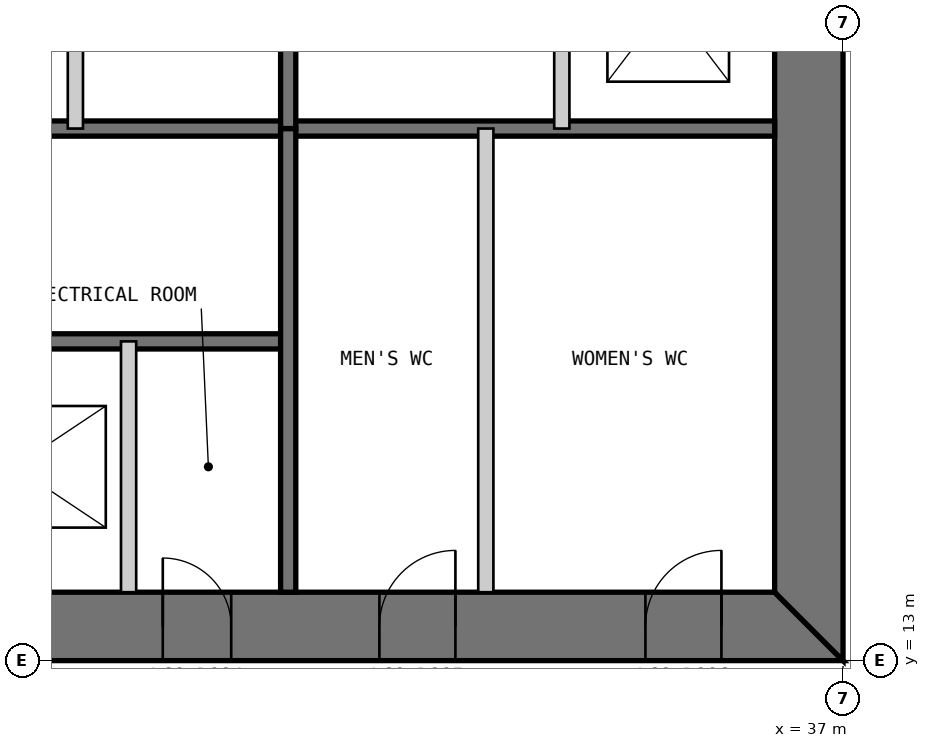
"""IFC4 building model, lengths in metres.
Left out: names, types, materials, properties, quantities, classifications, styles, units other than length and angle.
Written with IfcOpenShell. Run it as: python <this file> out.ifc"""

import sys

from ifc_helpers import new_model, si_unit, direction, frame, frame_2d, origin, place, context, subcontext, project, spatial, polyline, rectangle, outline, extrude, element, fill, save


model = new_model("IFC4")
c1 = context("Model", 3, precision=1e-05, world=origin(), true_north=direction((0.0, 1.0)))
c2 = subcontext(c1, "Body", "Model", "MODEL_VIEW")
j1 = project(units=[si_unit("LENGTHUNIT", "METRE"), si_unit("PLANEANGLEUNIT", "RADIAN")], contexts=[c1])
p1 = place(None, origin())
s1 = spatial("IfcSite", under=j1, at=p1, CompositionType="ELEMENT")
p2 = place(p1, origin())
s2 = spatial("IfcBuilding", under=s1, at=p2, CompositionType="ELEMENT")
p3 = place(p2, frame((0.0, 0.0, 256.0)))
s3 = spatial("IfcBuildingStorey", under=s2, at=p3, CompositionType="ELEMENT", Elevation=256.0)
p4 = place(p3, frame((13.0, 13.45, 0.0), z_axis=(0.0, 0.0, 1.0), x_axis=(1.0, 0.0, 0.0)))
e1 = element("IfcWall", 1, at=p4, inside=s3, PredefinedType="SHEAR", context=c2, shape_type="SweptSolid", body=[
    extrude(outline(polyline([(0.0, -0.45), (24.0, -0.45), (23.1, 0.45), (0.9, 0.45), (0.0, -0.45)])), origin(), (0.0, 0.0, 1.0), 3.4),
])
p5 = place(p4, frame((4.9, 0.0, 0.0)))
e2 = element("IfcOpeningElement", 2, at=p5, cuts=e1, PredefinedType="OPENING", context=c2, shape_type="SweptSolid", body=[
    extrude(rectangle(XDim=1.0, YDim=2.2, at=frame_2d((0.5, 1.1))), frame((0.0, 0.46, 0.0), z_axis=(0.0, -1.0, 0.0), x_axis=(1.0, 0.0, 0.0)), (0.0, 0.0, 1.0), 0.92),
])
p6 = place(p4, frame((8.9, 0.0, 0.0)))
e3 = element("IfcOpeningElement", 3, at=p6, cuts=e1, PredefinedType="OPENING", context=c2, shape_type="SweptSolid", body=[
    extrude(rectangle(XDim=1.1, YDim=2.2, at=frame_2d((0.55, 1.1))), frame((0.0, 0.46, 0.0), z_axis=(0.0, -1.0, 0.0), x_axis=(1.0, 0.0, 0.0)), (0.0, 0.0, 1.0), 0.92),
])
p7 = place(p4, frame((15.05, 0.0, 0.0)))
e4 = element("IfcOpeningElement", 4, at=p7, cuts=e1, PredefinedType="OPENING", context=c2, shape_type="SweptSolid", body=[
    extrude(rectangle(XDim=0.9, YDim=2.2, at=frame_2d((0.45, 1.1))), frame((0.0, 0.46, 0.0), z_axis=(0.0, -1.0, 0.0), x_axis=(1.0, 0.0, 0.0)), (0.0, 0.0, 1.0), 0.92),
])
p8 = place(p4, frame((17.9, 0.0, 0.0)))
e5 = element("IfcOpeningElement", 5, at=p8, cuts=e1, PredefinedType="OPENING", context=c2, shape_type="SweptSolid", body=[
    extrude(rectangle(XDim=1.0, YDim=2.2, at=frame_2d((0.5, 1.1))), frame((0.0, 0.46, 0.0), z_axis=(0.0, -1.0, 0.0), x_axis=(1.0, 0.0, 0.0)), (0.0, 0.0, 1.0), 0.92),
])
p9 = place(p4, frame((21.4, 0.0, 0.0)))
e6 = element("IfcOpeningElement", 6, at=p9, cuts=e1, PredefinedType="OPENING", context=c2, shape_type="SweptSolid", body=[
    extrude(rectangle(XDim=1.0, YDim=2.2, at=frame_2d((0.5, 1.1))), frame((0.0, 0.46, 0.0), z_axis=(0.0, -1.0, 0.0), x_axis=(1.0, 0.0, 0.0)), (0.0, 0.0, 1.0), 0.92),
])
p10 = place(p3, frame((36.55, 13.9, 0.0), z_axis=(0.0, 0.0, 1.0), x_axis=(0.0, 1.0, 0.0)))
e7 = element("IfcWall", 7, at=p10, inside=s3, PredefinedType="SHEAR", context=c2, shape_type="SweptSolid", body=[
    extrude(outline(polyline([(-0.9, -0.45), (23.1, -0.45), (22.2, 0.45), (0.0, 0.45), (-0.9, -0.45)])), origin(), (0.0, 0.0, 1.0), 3.4),
])
p11 = place(p10, frame((20.2, 0.0, 0.0)))
e8 = element("IfcOpeningElement", 8, at=p11, cuts=e7, PredefinedType="OPENING", context=c2, shape_type="SweptSolid", body=[
    extrude(rectangle(XDim=1.0, YDim=2.2, at=frame_2d((0.5, 1.1))), frame((0.0, 0.46, 0.0), z_axis=(0.0, -1.0, 0.0), x_axis=(1.0, 0.0, 0.0)), (0.0, 0.0, 1.0), 0.92),
])
p12 = place(p10, frame((17.25, 0.0, 0.0)))
e9 = element("IfcOpeningElement", 9, at=p12, cuts=e7, PredefinedType="OPENING", context=c2, shape_type="SweptSolid", body=[
    extrude(rectangle(XDim=0.9, YDim=2.2, at=frame_2d((0.45, 1.1))), frame((0.0, 0.46, 0.0), z_axis=(0.0, -1.0, 0.0), x_axis=(1.0, 0.0, 0.0)), (0.0, 0.0, 1.0), 0.92),
])
p13 = place(p3, frame((20.3, 17.2, 0.0), z_axis=(0.0, 0.0, 1.0), x_axis=(1.0, 0.0, 0.0)))
e10 = element("IfcWall", 10, at=p13, inside=s3, PredefinedType="SOLIDWALL", context=c2, shape_type="SweptSolid", body=[
    extrude(rectangle(XDim=9.4, YDim=0.2, at=frame_2d((4.7, 0.0))), origin(), (0.0, 0.0, 1.0), 3.2),
])
p14 = place(p13, frame((0.25, 0.0, 0.0)))
e11 = element("IfcOpeningElement", 11, at=p14, cuts=e10, PredefinedType="OPENING", context=c2, shape_type="SweptSolid", body=[
    extrude(rectangle(XDim=1.0, YDim=2.2, at=frame_2d((0.5, 1.1))), frame((0.0, 0.11, 0.0), z_axis=(0.0, -1.0, 0.0), x_axis=(1.0, 0.0, 0.0)), (0.0, 0.0, 1.0), 0.22),
])
p15 = place(p3, frame((20.3, 20.0, 0.0), z_axis=(0.0, 0.0, 1.0), x_axis=(1.0, 0.0, 0.0)))
e12 = element("IfcWall", 12, at=p15, inside=s3, PredefinedType="SOLIDWALL", context=c2, shape_type="SweptSolid", body=[
    extrude(rectangle(XDim=15.8, YDim=0.2, at=frame_2d((7.9, 0.0))), origin(), (0.0, 0.0, 1.0), 3.2),
])
p16 = place(p3, frame((27.6, 13.9, 0.0), z_axis=(0.0, 0.0, 1.0), x_axis=(0.0, 1.0, 0.0)))
e13 = element("IfcWall", 13, at=p16, inside=s3, PredefinedType="PARTITIONING", context=c2, shape_type="SweptSolid", body=[
    extrude(rectangle(XDim=3.3, YDim=0.2, at=frame_2d((1.65, 0.0))), origin(), (0.0, 0.0, 1.0), 3.2),
])
p17 = place(p3, frame((29.7, 13.9, 0.0), z_axis=(0.0, 0.0, 1.0), x_axis=(0.0, 1.0, 0.0)))
e14 = element("IfcWall", 14, at=p17, inside=s3, PredefinedType="SOLIDWALL", context=c2, shape_type="SweptSolid", body=[
    extrude(rectangle(XDim=6.1, YDim=0.2, at=frame_2d((3.05, 0.0))), origin(), (0.0, 0.0, 1.0), 3.2),
])
p18 = place(p3, frame((32.3, 13.9, 0.0), z_axis=(0.0, 0.0, 1.0), x_axis=(0.0, 1.0, 0.0)))
e15 = element("IfcWall", 15, at=p18, inside=s3, PredefinedType="PARTITIONING", context=c2, shape_type="SweptSolid", body=[
    extrude(rectangle(XDim=6.1, YDim=0.2, at=frame_2d((3.05, 0.0))), origin(), (0.0, 0.0, 1.0), 3.2),
])
p19 = place(p3, frame((33.3, 36.1, 0.0), z_axis=(0.0, 0.0, 1.0), x_axis=(0.0, -1.0, 0.0)))
e16 = element("IfcWall", 16, at=p19, inside=s3, PredefinedType="PARTITIONING", context=c2, shape_type="SweptSolid", body=[
    extrude(rectangle(XDim=16.1, YDim=0.2, at=frame_2d((8.05, 0.0))), origin(), (0.0, 0.0, 1.0), 3.2),
])
p20 = place(p19, frame((3.8, 0.0, 0.0)))
e17 = element("IfcOpeningElement", 17, at=p20, cuts=e16, PredefinedType="OPENING", context=c2, shape_type="SweptSolid", body=[
    extrude(rectangle(XDim=0.9, YDim=2.2, at=frame_2d((0.45, 1.1))), frame((0.0, 0.11, 0.0), z_axis=(0.0, -1.0, 0.0), x_axis=(1.0, 0.0, 0.0)), (0.0, 0.0, 1.0), 0.22),
])
p21 = place(p19, frame((7.217, 0.0, 0.0)))
e18 = element("IfcOpeningElement", 18, at=p21, cuts=e16, PredefinedType="OPENING", context=c2, shape_type="SweptSolid", body=[
    extrude(rectangle(XDim=1.1, YDim=2.2, at=frame_2d((0.55, 1.1))), frame((0.0, 0.11, 0.0), z_axis=(0.0, -1.0, 0.0), x_axis=(1.0, 0.0, 0.0)), (0.0, 0.0, 1.0), 0.22),
])
p22 = place(p19, frame((10.55, 0.0, 0.0)))
e19 = element("IfcOpeningElement", 19, at=p22, cuts=e16, PredefinedType="OPENING", context=c2, shape_type="SweptSolid", body=[
    extrude(rectangle(XDim=1.1, YDim=2.2, at=frame_2d((0.55, 1.1))), frame((0.0, 0.11, 0.0), z_axis=(0.0, -1.0, 0.0), x_axis=(1.0, 0.0, 0.0)), (0.0, 0.0, 1.0), 0.22),
])
p23 = place(p19, frame((13.883, 0.0, 0.0)))
e20 = element("IfcOpeningElement", 20, at=p23, cuts=e16, PredefinedType="OPENING", context=c2, shape_type="SweptSolid", body=[
    extrude(rectangle(XDim=1.1, YDim=2.2, at=frame_2d((0.55, 1.1))), frame((0.0, 0.11, 0.0), z_axis=(0.0, -1.0, 0.0), x_axis=(1.0, 0.0, 0.0)), (0.0, 0.0, 1.0), 0.22),
])
p24 = place(p3, frame((29.7, 36.1, 0.0), z_axis=(0.0, 0.0, 1.0), x_axis=(0.0, -1.0, 0.0)))
e21 = element("IfcWall", 21, at=p24, inside=s3, PredefinedType="SOLIDWALL", context=c2, shape_type="SweptSolid", body=[
    extrude(rectangle(XDim=16.1, YDim=0.2, at=frame_2d((8.05, 0.0))), origin(), (0.0, 0.0, 1.0), 3.2),
])
p25 = place(p24, frame((10.65, 0.0, 0.0)))
e22 = element("IfcOpeningElement", 22, at=p25, cuts=e21, PredefinedType="OPENING", context=c2, shape_type="SweptSolid", body=[
    extrude(rectangle(XDim=0.9, YDim=2.2, at=frame_2d((0.45, 1.1))), frame((0.0, 0.11, 0.0), z_axis=(0.0, -1.0, 0.0), x_axis=(1.0, 0.0, 0.0)), (0.0, 0.0, 1.0), 0.22),
])
p26 = place(p3, frame((26.9, 30.0, 0.0), z_axis=(0.0, 0.0, 1.0), x_axis=(0.0, -1.0, 0.0)))
e23 = element("IfcWall", 23, at=p26, inside=s3, PredefinedType="PARTITIONING", context=c2, shape_type="SweptSolid", body=[
    extrude(rectangle(XDim=10.0, YDim=0.2, at=frame_2d((5.0, 0.0))), origin(), (0.0, 0.0, 1.0), 3.2),
])
p27 = place(p7, origin())
e24 = element("IfcDoor", 24, at=p27, inside=s3, OperationType="SINGLE_SWING_LEFT", PredefinedType="DOOR", context=c2, shape_type="SweptSolid", body=[
    extrude(rectangle(XDim=0.9, YDim=2.2, at=frame_2d((0.45, 1.1))), frame((0.0, 0.025, 0.0), z_axis=(0.0, -1.0, 0.0), x_axis=(1.0, 0.0, 0.0)), (0.0, 0.0, 1.0), 0.05),
    extrude(outline(polyline([(0.0, 0.0), (0.04, 0.0), (0.04, 2.16), (0.86, 2.16), (0.86, 0.0), (0.9, 0.0), (0.9, 2.2), (0.0, 2.2), (0.0, 0.0)])), frame((0.0, 0.3, 0.0), z_axis=(0.0, -1.0, 0.0), x_axis=(1.0, 0.0, 0.0)), (0.0, 0.0, 1.0), 0.6),
])
fill(e4, e24)
p28 = place(p8, origin())
e25 = element("IfcDoor", 25, at=p28, inside=s3, OperationType="SINGLE_SWING_RIGHT", PredefinedType="DOOR", context=c2, shape_type="SweptSolid", body=[
    extrude(rectangle(XDim=1.0, YDim=2.2, at=frame_2d((0.5, 1.1))), frame((0.0, 0.025, 0.0), z_axis=(0.0, -1.0, 0.0), x_axis=(1.0, 0.0, 0.0)), (0.0, 0.0, 1.0), 0.05),
    extrude(outline(polyline([(0.0, 0.0), (0.04, 0.0), (0.04, 2.16), (0.96, 2.16), (0.96, 0.0), (1.0, 0.0), (1.0, 2.2), (0.0, 2.2), (0.0, 0.0)])), frame((0.0, 0.3, 0.0), z_axis=(0.0, -1.0, 0.0), x_axis=(1.0, 0.0, 0.0)), (0.0, 0.0, 1.0), 0.6),
])
fill(e5, e25)
p29 = place(p9, origin())
e26 = element("IfcDoor", 26, at=p29, inside=s3, OperationType="SINGLE_SWING_RIGHT", PredefinedType="DOOR", context=c2, shape_type="SweptSolid", body=[
    extrude(rectangle(XDim=1.0, YDim=2.2, at=frame_2d((0.5, 1.1))), frame((0.0, 0.025, 0.0), z_axis=(0.0, -1.0, 0.0), x_axis=(1.0, 0.0, 0.0)), (0.0, 0.0, 1.0), 0.05),
    extrude(outline(polyline([(0.0, 0.0), (0.04, 0.0), (0.04, 2.16), (0.96, 2.16), (0.96, 0.0), (1.0, 0.0), (1.0, 2.2), (0.0, 2.2), (0.0, 0.0)])), frame((0.0, 0.3, 0.0), z_axis=(0.0, -1.0, 0.0), x_axis=(1.0, 0.0, 0.0)), (0.0, 0.0, 1.0), 0.6),
])
fill(e6, e26)
save(model, sys.argv[1])
